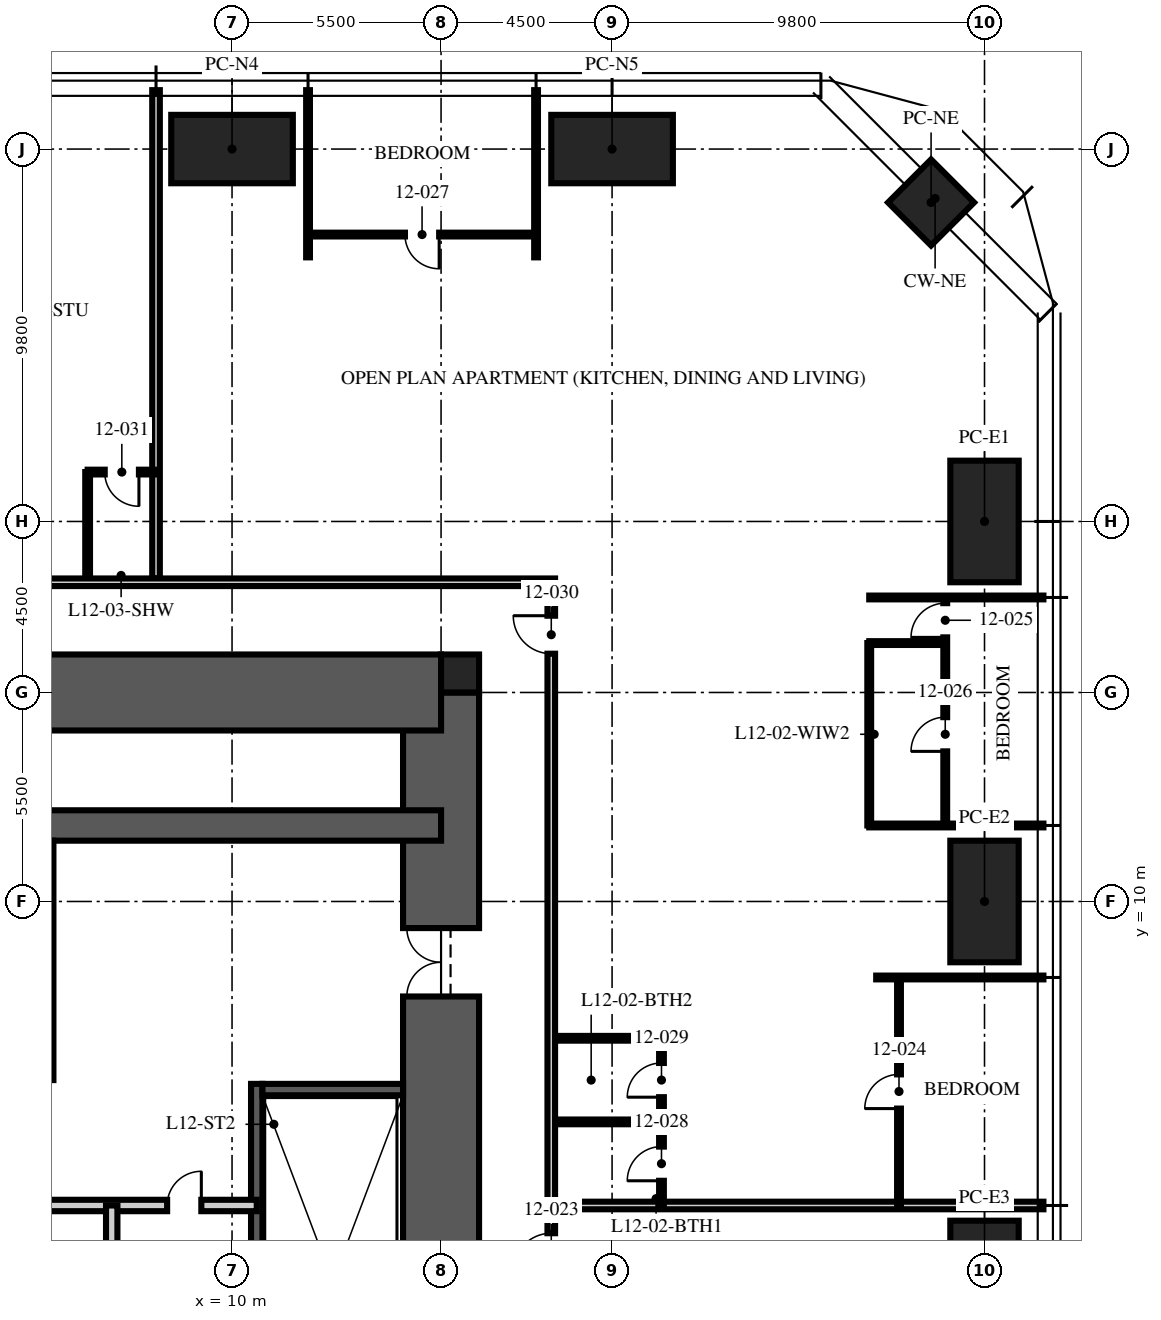
"""IFC4 building model, lengths in metres.
Left out: names, types, materials, properties, quantities, classifications, styles, units other than length and angle.
Written with IfcOpenShell. Run it as: python <this file> out.ifc"""

import sys

from ifc_helpers import new_model, si_unit, direction, frame, frame_2d, origin, origin_2d, place, context, subcontext, project, spatial, rectangle, hollow_rectangle, extrude, element, fill, save


model = new_model("IFC4")
c1 = context("Model", 3, precision=1e-05, world=origin(), true_north=direction((0.0, 1.0)))
c2 = subcontext(c1, "Body", "Model", "MODEL_VIEW")
j1 = project(units=[si_unit("LENGTHUNIT", "METRE"), si_unit("PLANEANGLEUNIT", "RADIAN")], contexts=[c1])
p1 = place(None, origin())
s1 = spatial("IfcSite", under=j1, at=p1, CompositionType="ELEMENT")
p2 = place(p1, origin())
s2 = spatial("IfcBuilding", under=s1, at=p2, CompositionType="ELEMENT")
p3 = place(p2, frame((0.0, 0.0, 51.0)))
s3 = spatial("IfcBuildingStorey", under=s2, at=p3, CompositionType="ELEMENT", Elevation=51.0)
p4 = place(p3, frame((15.5, -15.5, -0.25), z_axis=(0.0, 0.0, 1.0), x_axis=(0.0, 1.0, 0.0)))
e1 = element("IfcWall", 1, at=p4, inside=s3, PredefinedType="SHEAR", context=c2, shape_type="SweptSolid", body=[
    extrude(rectangle(XDim=31.0, YDim=2.0, at=frame_2d((15.5, 0.0))), origin(), (0.0, 0.0, 1.0), 3.75),
])
p5 = place(p4, frame((6.5, 0.0, 0.25)))
e2 = element("IfcOpeningElement", 2, at=p5, cuts=e1, PredefinedType="OPENING", context=c2, shape_type="SweptSolid", body=[
    extrude(rectangle(XDim=1.2, YDim=2.1, at=frame_2d((0.6, 1.05))), frame((0.0, 1.01, 0.0), z_axis=(0.0, -1.0, 0.0), x_axis=(1.0, 0.0, 0.0)), (0.0, 0.0, 1.0), 2.02),
])
p6 = place(p4, frame((23.0, 0.0, 0.25)))
e3 = element("IfcOpeningElement", 3, at=p6, cuts=e1, PredefinedType="OPENING", context=c2, shape_type="SweptSolid", body=[
    extrude(rectangle(XDim=1.8, YDim=2.1, at=frame_2d((0.9, 1.05))), frame((0.0, 1.01, 0.0), z_axis=(0.0, -1.0, 0.0), x_axis=(1.0, 0.0, 0.0)), (0.0, 0.0, 1.0), 2.02),
])
p7 = place(p3, frame((-15.5, 15.5, -0.25), z_axis=(0.0, 0.0, 1.0), x_axis=(1.0, 0.0, 0.0)))
e4 = element("IfcWall", 4, at=p7, inside=s3, PredefinedType="SHEAR", context=c2, shape_type="SweptSolid", body=[
    extrude(rectangle(XDim=31.0, YDim=2.0, at=frame_2d((15.5, 0.0))), origin(), (0.0, 0.0, 1.0), 3.75),
])
p8 = place(p7, frame((10.4, 0.0, 0.25)))
e5 = element("IfcOpeningElement", 5, at=p8, cuts=e4, PredefinedType="OPENING", context=c2, shape_type="SweptSolid", body=[
    extrude(rectangle(XDim=1.1, YDim=2.1, at=frame_2d((0.55, 1.05))), frame((0.0, 1.01, 0.0), z_axis=(0.0, -1.0, 0.0), x_axis=(1.0, 0.0, 0.0)), (0.0, 0.0, 1.0), 2.02),
])
p9 = place(p7, frame((13.5, 0.0, 0.25)))
e6 = element("IfcOpeningElement", 6, at=p9, cuts=e4, PredefinedType="OPENING", context=c2, shape_type="SweptSolid", body=[
    extrude(rectangle(XDim=1.1, YDim=2.1, at=frame_2d((0.55, 1.05))), frame((0.0, 1.01, 0.0), z_axis=(0.0, -1.0, 0.0), x_axis=(1.0, 0.0, 0.0)), (0.0, 0.0, 1.0), 2.02),
])
p10 = place(p7, frame((16.6, 0.0, 0.25)))
e7 = element("IfcOpeningElement", 7, at=p10, cuts=e4, PredefinedType="OPENING", context=c2, shape_type="SweptSolid", body=[
    extrude(rectangle(XDim=1.1, YDim=2.1, at=frame_2d((0.55, 1.05))), frame((0.0, 1.01, 0.0), z_axis=(0.0, -1.0, 0.0), x_axis=(1.0, 0.0, 0.0)), (0.0, 0.0, 1.0), 2.02),
])
p11 = place(p3, frame((-15.5, 12.0, -0.25), z_axis=(0.0, 0.0, 1.0), x_axis=(1.0, 0.0, 0.0)))
e8 = element("IfcWall", 8, at=p11, inside=s3, PredefinedType="SHEAR", context=c2, shape_type="SweptSolid", body=[
    extrude(rectangle(XDim=31.0, YDim=0.8, at=frame_2d((15.5, 0.0))), origin(), (0.0, 0.0, 1.0), 3.75),
])
p12 = place(p3, frame((16.0, 16.0, -0.25), z_axis=(0.0, 0.0, 1.0), x_axis=(1.0, 0.0, 0.0)))
e9 = element("IfcColumn", 9, at=p12, inside=s3, PredefinedType="COLUMN", context=c2, shape_type="SweptSolid", body=[
    extrude(rectangle(XDim=1.0, YDim=1.0, at=origin_2d()), origin(), (0.0, 0.0, 1.0), 3.75),
])
for number, where, z_axis, x_axis in (
    (10, (10.0, 29.8, 0.0), (0.0, 0.0, 1.0), (1.0, 0.0, 0.0)),
    (11, (20.0, 29.8, 0.0), (0.0, 0.0, 1.0), (1.0, 0.0, 0.0)),
    (12, (29.8, 20.0, 0.0), (0.0, 0.0, 1.0), (0.0, 1.0, 0.0)),
    (13, (29.8, 10.0, 0.0), (0.0, 0.0, 1.0), (0.0, 1.0, 0.0)),
    (14, (29.8, 0.0, 0.0), (0.0, 0.0, 1.0), (0.0, 1.0, 0.0)),
):
    element("IfcColumn", number, at=place(p3, frame(where, z_axis=z_axis, x_axis=x_axis)), inside=s3, PredefinedType="COLUMN", context=c2, shape_type="SweptSolid", body=[
        extrude(hollow_rectangle(XDim=3.2, YDim=1.8, WallThickness=0.2, at=origin_2d()), origin(), (0.0, 0.0, 1.0), 3.75),
    ])
p13 = place(p3, frame((28.394, 28.394, 0.0), z_axis=(0.0, 0.0, 1.0), x_axis=(0.707106781187, -0.707106781187, 0.0)))
e15 = element("IfcColumn", 15, at=p13, inside=s3, PredefinedType="COLUMN", context=c2, shape_type="SweptSolid", body=[
    extrude(hollow_rectangle(XDim=1.6, YDim=1.6, WallThickness=0.1, at=origin_2d()), origin(), (0.0, 0.0, 1.0), 3.75),
])
p14 = place(p3, frame((10.65, -4.9, 0.0), z_axis=(0.0, 0.0, 1.0), x_axis=(0.0, 1.0, 0.0)))
e16 = element("IfcWall", 16, at=p14, inside=s3, PredefinedType="SOLIDWALL", context=c2, shape_type="SweptSolid", body=[
    extrude(rectangle(XDim=10.1, YDim=0.3, at=frame_2d((5.05, 0.0))), origin(), (0.0, 0.0, 1.0), 3.5),
])
p15 = place(p3, frame((14.5, 5.05, 0.0), z_axis=(0.0, 0.0, 1.0), x_axis=(-1.0, 0.0, 0.0)))
e17 = element("IfcWall", 17, at=p15, inside=s3, PredefinedType="SOLIDWALL", context=c2, shape_type="SweptSolid", body=[
    extrude(rectangle(XDim=3.7, YDim=0.3, at=frame_2d((1.85, 0.0))), origin(), (0.0, 0.0, 1.0), 3.5),
])
p16 = place(p3, frame((-10.65, 2.0, 0.0), z_axis=(0.0, 0.0, 1.0), x_axis=(1.0, 0.0, 0.0)))
e18 = element("IfcWall", 18, at=p16, inside=s3, PredefinedType="PARTITIONING", context=c2, shape_type="SweptSolid", body=[
    extrude(rectangle(XDim=21.3, YDim=0.3, at=frame_2d((10.65, 0.0))), origin(), (0.0, 0.0, 1.0), 3.5),
])
p17 = place(p16, frame((10.05, 0.0, 0.0)))
e19 = element("IfcOpeningElement", 19, at=p17, cuts=e18, PredefinedType="OPENING", context=c2, shape_type="SweptSolid", body=[
    extrude(rectangle(XDim=1.2, YDim=2.1, at=frame_2d((0.6, 1.05))), frame((0.0, 0.16, 0.0), z_axis=(0.0, -1.0, 0.0), x_axis=(1.0, 0.0, 0.0)), (0.0, 0.0, 1.0), 0.32),
])
p18 = place(p16, frame((18.942, 0.0, 0.0)))
e20 = element("IfcOpeningElement", 20, at=p18, cuts=e18, PredefinedType="OPENING", context=c2, shape_type="SweptSolid", body=[
    extrude(rectangle(XDim=0.9, YDim=2.1, at=frame_2d((0.45, 1.05))), frame((0.0, 0.16, 0.0), z_axis=(0.0, -1.0, 0.0), x_axis=(1.0, 0.0, 0.0)), (0.0, 0.0, 1.0), 0.32),
])
p19 = place(p3, frame((6.834, -6.65, 0.0), z_axis=(0.0, 0.0, 1.0), x_axis=(0.0, 1.0, 0.0)))
e21 = element("IfcWall", 21, at=p19, inside=s3, PredefinedType="PARTITIONING", context=c2, shape_type="SweptSolid", body=[
    extrude(rectangle(XDim=8.65, YDim=0.3, at=frame_2d((4.325, 0.0))), origin(), (0.0, 0.0, 1.0), 3.5),
])
p20 = place(p3, frame((5.15, 5.3, 0.0), z_axis=(0.0, 0.0, 1.0), x_axis=(0.0, 1.0, 0.0)))
e22 = element("IfcWall", 22, at=p20, inside=s3, PredefinedType="PARTITIONING", context=c2, shape_type="SweptSolid", body=[
    extrude(rectangle(XDim=6.3, YDim=0.3, at=frame_2d((3.15, 0.0))), origin(), (0.0, 0.0, 1.0), 3.5),
])
p21 = place(p3, frame((18.5, 2.0, 0.0), z_axis=(0.0, 0.0, 1.0), x_axis=(1.0, 0.0, 0.0)))
e23 = element("IfcWall", 23, at=p21, inside=s3, PredefinedType="PARTITIONING", context=c2, shape_type="SweptSolid", body=[
    extrude(rectangle(XDim=12.85, YDim=0.2, at=frame_2d((6.425, 0.0))), origin(), (0.0, 0.0, 1.0), 2.71),
])
p22 = place(p3, frame((26.95, 8.0, 0.0), z_axis=(0.0, 0.0, 1.0), x_axis=(1.0, 0.0, 0.0)))
e24 = element("IfcWall", 24, at=p22, inside=s3, PredefinedType="PARTITIONING", context=c2, shape_type="SweptSolid", body=[
    extrude(rectangle(XDim=4.4, YDim=0.1, at=frame_2d((2.2, 0.0))), origin(), (0.0, 0.0, 1.0), 2.71),
])
for number, where, z_axis, x_axis in (
    (25, (26.767, 12.0, 0.0), (0.0, 0.0, 1.0), (1.0, 0.0, 0.0)),
    (26, (26.767, 18.0, 0.0), (0.0, 0.0, 1.0), (1.0, 0.0, 0.0)),
):
    element("IfcWall", number, at=place(p3, frame(where, z_axis=z_axis, x_axis=x_axis)), inside=s3, PredefinedType="PARTITIONING", context=c2, shape_type="SweptSolid", body=[
        extrude(rectangle(XDim=4.583, YDim=0.1, at=frame_2d((2.292, 0.0))), origin(), (0.0, 0.0, 1.0), 2.71),
    ])
for number, where, z_axis, x_axis in (
    (27, (18.0, 26.95, 0.0), (0.0, 0.0, 1.0), (0.0, 1.0, 0.0)),
    (28, (12.0, 26.95, 0.0), (0.0, 0.0, 1.0), (0.0, 1.0, 0.0)),
):
    element("IfcWall", number, at=place(p3, frame(where, z_axis=z_axis, x_axis=x_axis)), inside=s3, PredefinedType="PARTITIONING", context=c2, shape_type="SweptSolid", body=[
        extrude(rectangle(XDim=4.4, YDim=0.1, at=frame_2d((2.2, 0.0))), origin(), (0.0, 0.0, 1.0), 2.71),
    ])
p23 = place(p3, frame((8.0, 18.5, 0.0), z_axis=(0.0, 0.0, 1.0), x_axis=(0.0, 1.0, 0.0)))
e29 = element("IfcWall", 29, at=p23, inside=s3, PredefinedType="PARTITIONING", context=c2, shape_type="SweptSolid", body=[
    extrude(rectangle(XDim=12.85, YDim=0.2, at=frame_2d((6.425, 0.0))), origin(), (0.0, 0.0, 1.0), 2.71),
])
p24 = place(p3, frame((27.55, 2.0, 0.0), z_axis=(0.0, 0.0, 1.0), x_axis=(0.0, 1.0, 0.0)))
e30 = element("IfcWall", 30, at=p24, inside=s3, PredefinedType="PARTITIONING", context=c2, shape_type="SweptSolid", body=[
    extrude(rectangle(XDim=6.0, YDim=0.1, at=frame_2d((3.0, 0.0))), origin(), (0.0, 0.0, 1.0), 2.61),
])
p25 = place(p24, frame((2.55, 0.0, 0.0)))
e31 = element("IfcOpeningElement", 31, at=p25, cuts=e30, PredefinedType="OPENING", context=c2, shape_type="SweptSolid", body=[
    extrude(rectangle(XDim=0.9, YDim=2.1, at=frame_2d((0.45, 1.05))), frame((0.0, 0.06, 0.0), z_axis=(0.0, -1.0, 0.0), x_axis=(1.0, 0.0, 0.0)), (0.0, 0.0, 1.0), 0.12),
])
p26 = place(p3, frame((28.767, 12.0, 0.0), z_axis=(0.0, 0.0, 1.0), x_axis=(0.0, 1.0, 0.0)))
e32 = element("IfcWall", 32, at=p26, inside=s3, PredefinedType="PARTITIONING", context=c2, shape_type="SweptSolid", body=[
    extrude(rectangle(XDim=6.0, YDim=0.1, at=frame_2d((3.0, 0.0))), origin(), (0.0, 0.0, 1.0), 2.61),
])
p27 = place(p26, frame((4.95, 0.0, 0.0)))
e33 = element("IfcOpeningElement", 33, at=p27, cuts=e32, PredefinedType="OPENING", context=c2, shape_type="SweptSolid", body=[
    extrude(rectangle(XDim=0.9, YDim=2.1, at=frame_2d((0.45, 1.05))), frame((0.0, 0.06, 0.0), z_axis=(0.0, -1.0, 0.0), x_axis=(1.0, 0.0, 0.0)), (0.0, 0.0, 1.0), 0.12),
])
p28 = place(p26, frame((1.95, 0.0, 0.0)))
e34 = element("IfcOpeningElement", 34, at=p28, cuts=e32, PredefinedType="OPENING", context=c2, shape_type="SweptSolid", body=[
    extrude(rectangle(XDim=0.9, YDim=2.1, at=frame_2d((0.45, 1.05))), frame((0.0, 0.06, 0.0), z_axis=(0.0, -1.0, 0.0), x_axis=(1.0, 0.0, 0.0)), (0.0, 0.0, 1.0), 0.12),
])
p29 = place(p3, frame((26.767, 16.8, 0.0), z_axis=(0.0, 0.0, 1.0), x_axis=(1.0, 0.0, 0.0)))
e35 = element("IfcWall", 35, at=p29, inside=s3, PredefinedType="PARTITIONING", context=c2, shape_type="SweptSolid", body=[
    extrude(rectangle(XDim=2.0, YDim=0.1, at=frame_2d((1.0, 0.0))), origin(), (0.0, 0.0, 1.0), 3.5),
])
p30 = place(p3, frame((26.767, 12.0, 0.0), z_axis=(0.0, 0.0, 1.0), x_axis=(0.0, 1.0, 0.0)))
e36 = element("IfcWall", 36, at=p30, inside=s3, PredefinedType="PARTITIONING", context=c2, shape_type="SweptSolid", body=[
    extrude(rectangle(XDim=4.8, YDim=0.1, at=frame_2d((2.4, 0.0))), origin(), (0.0, 0.0, 1.0), 2.61),
])
p31 = place(p3, frame((18.0, 27.55, 0.0), z_axis=(0.0, 0.0, 1.0), x_axis=(-1.0, 0.0, 0.0)))
e37 = element("IfcWall", 37, at=p31, inside=s3, PredefinedType="PARTITIONING", context=c2, shape_type="SweptSolid", body=[
    extrude(rectangle(XDim=6.0, YDim=0.1, at=frame_2d((3.0, 0.0))), origin(), (0.0, 0.0, 1.0), 2.61),
])
p32 = place(p31, frame((2.55, 0.0, 0.0)))
e38 = element("IfcOpeningElement", 38, at=p32, cuts=e37, PredefinedType="OPENING", context=c2, shape_type="SweptSolid", body=[
    extrude(rectangle(XDim=0.9, YDim=2.1, at=frame_2d((0.45, 1.05))), frame((0.0, 0.06, 0.0), z_axis=(0.0, -1.0, 0.0), x_axis=(1.0, 0.0, 0.0)), (0.0, 0.0, 1.0), 0.12),
])
p33 = place(p3, frame((21.3, 2.0, 0.0), z_axis=(0.0, 0.0, 1.0), x_axis=(0.0, 1.0, 0.0)))
e39 = element("IfcWall", 39, at=p33, inside=s3, PredefinedType="PARTITIONING", context=c2, shape_type="SweptSolid", body=[
    extrude(rectangle(XDim=4.4, YDim=0.125, at=frame_2d((2.2, 0.0))), origin(), (0.0, 0.0, 1.0), 2.61),
])
p34 = place(p33, frame((0.65, 0.0, 0.0)))
e40 = element("IfcOpeningElement", 40, at=p34, cuts=e39, PredefinedType="OPENING", context=c2, shape_type="SweptSolid", body=[
    extrude(rectangle(XDim=0.9, YDim=2.1, at=frame_2d((0.45, 1.05))), frame((0.0, 0.073, 0.0), z_axis=(0.0, -1.0, 0.0), x_axis=(1.0, 0.0, 0.0)), (0.0, 0.0, 1.0), 0.145),
])
p35 = place(p33, frame((2.85, 0.0, 0.0)))
e41 = element("IfcOpeningElement", 41, at=p35, cuts=e39, PredefinedType="OPENING", context=c2, shape_type="SweptSolid", body=[
    extrude(rectangle(XDim=0.9, YDim=2.1, at=frame_2d((0.45, 1.05))), frame((0.0, 0.073, 0.0), z_axis=(0.0, -1.0, 0.0), x_axis=(1.0, 0.0, 0.0)), (0.0, 0.0, 1.0), 0.145),
])
for number, where, z_axis, x_axis in (
    (42, (18.5, 4.2, 0.0), (0.0, 0.0, 1.0), (1.0, 0.0, 0.0)),
    (43, (18.5, 6.4, 0.0), (0.0, 0.0, 1.0), (1.0, 0.0, 0.0)),
):
    element("IfcWall", number, at=place(p3, frame(where, z_axis=z_axis, x_axis=x_axis)), inside=s3, PredefinedType="PARTITIONING", context=c2, shape_type="SweptSolid", body=[
        extrude(rectangle(XDim=2.8, YDim=0.125, at=frame_2d((1.4, 0.0))), origin(), (0.0, 0.0, 1.0), 3.5),
    ])
p36 = place(p3, frame((8.0, 21.3, 0.0), z_axis=(0.0, 0.0, 1.0), x_axis=(-1.0, 0.0, 0.0)))
e44 = element("IfcWall", 44, at=p36, inside=s3, PredefinedType="PARTITIONING", context=c2, shape_type="SweptSolid", body=[
    extrude(rectangle(XDim=1.8, YDim=0.125, at=frame_2d((0.9, 0.0))), origin(), (0.0, 0.0, 1.0), 3.5),
])
p37 = place(p36, frame((0.45, 0.0, 0.0)))
e45 = element("IfcOpeningElement", 45, at=p37, cuts=e44, PredefinedType="OPENING", context=c2, shape_type="SweptSolid", body=[
    extrude(rectangle(XDim=0.9, YDim=2.1, at=frame_2d((0.45, 1.05))), frame((0.0, 0.073, 0.0), z_axis=(0.0, -1.0, 0.0), x_axis=(1.0, 0.0, 0.0)), (0.0, 0.0, 1.0), 0.145),
])
p38 = place(p3, frame((6.2, 18.5, 0.0), z_axis=(0.0, 0.0, 1.0), x_axis=(0.0, 1.0, 0.0)))
e46 = element("IfcWall", 46, at=p38, inside=s3, PredefinedType="PARTITIONING", context=c2, shape_type="SweptSolid", body=[
    extrude(rectangle(XDim=2.8, YDim=0.125, at=frame_2d((1.4, 0.0))), origin(), (0.0, 0.0, 1.0), 3.5),
])
p39 = place(p3, frame((18.4, -10.0, 0.0), z_axis=(0.0, 0.0, 1.0), x_axis=(0.0, 1.0, 0.0)))
e47 = element("IfcWall", 47, at=p39, inside=s3, PredefinedType="PARTITIONING", context=c2, shape_type="SweptSolid", body=[
    extrude(rectangle(XDim=28.3, YDim=0.2, at=frame_2d((14.15, 0.0))), origin(), (0.0, 0.0, 1.0), 2.3),
])
p40 = place(p39, frame((10.27, 0.0, 0.0)))
e48 = element("IfcOpeningElement", 48, at=p40, cuts=e47, PredefinedType="OPENING", context=c2, shape_type="SweptSolid", body=[
    extrude(rectangle(XDim=1.0, YDim=2.2, at=frame_2d((0.5, 1.1))), frame((0.0, 0.11, 0.0), z_axis=(0.0, -1.0, 0.0), x_axis=(1.0, 0.0, 0.0)), (0.0, 0.0, 1.0), 0.22),
])
p41 = place(p39, frame((26.52, 0.0, 0.0)))
e49 = element("IfcOpeningElement", 49, at=p41, cuts=e47, PredefinedType="OPENING", context=c2, shape_type="SweptSolid", body=[
    extrude(rectangle(XDim=1.0, YDim=2.2, at=frame_2d((0.5, 1.1))), frame((0.0, 0.11, 0.0), z_axis=(0.0, -1.0, 0.0), x_axis=(1.0, 0.0, 0.0)), (0.0, 0.0, 1.0), 0.22),
])
p42 = place(p3, frame((4.0, 18.4, 0.0), z_axis=(0.0, 0.0, 1.0), x_axis=(1.0, 0.0, 0.0)))
e50 = element("IfcWall", 50, at=p42, inside=s3, PredefinedType="PARTITIONING", context=c2, shape_type="SweptSolid", body=[
    extrude(rectangle(XDim=14.5, YDim=0.2, at=frame_2d((7.25, 0.0))), origin(), (0.0, 0.0, 1.0), 2.3),
])
p43 = place(p6, origin())
e51 = element("IfcDoor", 51, at=p43, inside=s3, OperationType="DOUBLE_DOOR_SINGLE_SWING", PredefinedType="DOOR", context=c2, shape_type="SweptSolid", body=[
    extrude(rectangle(XDim=1.8, YDim=2.1, at=frame_2d((0.9, 1.05))), frame((0.0, 0.025, 0.0), z_axis=(0.0, -1.0, 0.0), x_axis=(1.0, 0.0, 0.0)), (0.0, 0.0, 1.0), 0.05),
])
fill(e3, e51)
p44 = place(p18, origin())
e52 = element("IfcDoor", 52, at=p44, inside=s3, OperationType="SINGLE_SWING_RIGHT", PredefinedType="DOOR", context=c2, shape_type="SweptSolid", body=[
    extrude(rectangle(XDim=0.9, YDim=2.1, at=frame_2d((0.45, 1.05))), frame((0.0, 0.025, 0.0), z_axis=(0.0, -1.0, 0.0), x_axis=(1.0, 0.0, 0.0)), (0.0, 0.0, 1.0), 0.05),
])
fill(e20, e52)
p45 = place(p40, origin())
e53 = element("IfcDoor", 53, at=p45, inside=s3, OperationType="SINGLE_SWING_LEFT", PredefinedType="DOOR", context=c2, shape_type="SweptSolid", body=[
    extrude(rectangle(XDim=1.0, YDim=2.2, at=frame_2d((0.5, 1.1))), frame((0.0, 0.025, 0.0), z_axis=(0.0, -1.0, 0.0), x_axis=(1.0, 0.0, 0.0)), (0.0, 0.0, 1.0), 0.05),
])
fill(e48, e53)
p46 = place(p25, origin())
e54 = element("IfcDoor", 54, at=p46, inside=s3, OperationType="SINGLE_SWING_LEFT", PredefinedType="DOOR", context=c2, shape_type="SweptSolid", body=[
    extrude(rectangle(XDim=0.9, YDim=2.1, at=frame_2d((0.45, 1.05))), frame((0.0, 0.025, 0.0), z_axis=(0.0, -1.0, 0.0), x_axis=(1.0, 0.0, 0.0)), (0.0, 0.0, 1.0), 0.05),
])
fill(e31, e54)
p47 = place(p27, origin())
e55 = element("IfcDoor", 55, at=p47, inside=s3, OperationType="SINGLE_SWING_LEFT", PredefinedType="DOOR", context=c2, shape_type="SweptSolid", body=[
    extrude(rectangle(XDim=0.9, YDim=2.1, at=frame_2d((0.45, 1.05))), frame((0.0, 0.025, 0.0), z_axis=(0.0, -1.0, 0.0), x_axis=(1.0, 0.0, 0.0)), (0.0, 0.0, 1.0), 0.05),
])
fill(e33, e55)
p48 = place(p28, origin())
e56 = element("IfcDoor", 56, at=p48, inside=s3, OperationType="SINGLE_SWING_LEFT", PredefinedType="DOOR", context=c2, shape_type="SweptSolid", body=[
    extrude(rectangle(XDim=0.9, YDim=2.1, at=frame_2d((0.45, 1.05))), frame((0.0, 0.025, 0.0), z_axis=(0.0, -1.0, 0.0), x_axis=(1.0, 0.0, 0.0)), (0.0, 0.0, 1.0), 0.05),
])
fill(e34, e56)
p49 = place(p32, origin())
e57 = element("IfcDoor", 57, at=p49, inside=s3, OperationType="SINGLE_SWING_LEFT", PredefinedType="DOOR", context=c2, shape_type="SweptSolid", body=[
    extrude(rectangle(XDim=0.9, YDim=2.1, at=frame_2d((0.45, 1.05))), frame((0.0, 0.025, 0.0), z_axis=(0.0, -1.0, 0.0), x_axis=(1.0, 0.0, 0.0)), (0.0, 0.0, 1.0), 0.05),
])
fill(e38, e57)
p50 = place(p34, origin())
e58 = element("IfcDoor", 58, at=p50, inside=s3, OperationType="SINGLE_SWING_LEFT", PredefinedType="DOOR", context=c2, shape_type="SweptSolid", body=[
    extrude(rectangle(XDim=0.9, YDim=2.1, at=frame_2d((0.45, 1.05))), frame((0.0, 0.025, 0.0), z_axis=(0.0, -1.0, 0.0), x_axis=(1.0, 0.0, 0.0)), (0.0, 0.0, 1.0), 0.05),
])
fill(e40, e58)
p51 = place(p35, origin())
e59 = element("IfcDoor", 59, at=p51, inside=s3, OperationType="SINGLE_SWING_LEFT", PredefinedType="DOOR", context=c2, shape_type="SweptSolid", body=[
    extrude(rectangle(XDim=0.9, YDim=2.1, at=frame_2d((0.45, 1.05))), frame((0.0, 0.025, 0.0), z_axis=(0.0, -1.0, 0.0), x_axis=(1.0, 0.0, 0.0)), (0.0, 0.0, 1.0), 0.05),
])
fill(e41, e59)
p52 = place(p41, origin())
e60 = element("IfcDoor", 60, at=p52, inside=s3, OperationType="SINGLE_SWING_RIGHT", PredefinedType="DOOR", context=c2, shape_type="SweptSolid", body=[
    extrude(rectangle(XDim=1.0, YDim=2.2, at=frame_2d((0.5, 1.1))), frame((0.0, 0.025, 0.0), z_axis=(0.0, -1.0, 0.0), x_axis=(1.0, 0.0, 0.0)), (0.0, 0.0, 1.0), 0.05),
])
fill(e49, e60)
p53 = place(p37, origin())
e61 = element("IfcDoor", 61, at=p53, inside=s3, OperationType="SINGLE_SWING_LEFT", PredefinedType="DOOR", context=c2, shape_type="SweptSolid", body=[
    extrude(rectangle(XDim=0.9, YDim=2.1, at=frame_2d((0.45, 1.05))), frame((0.0, 0.025, 0.0), z_axis=(0.0, -1.0, 0.0), x_axis=(1.0, 0.0, 0.0)), (0.0, 0.0, 1.0), 0.05),
])
fill(e45, e61)
save(model, sys.argv[1])
